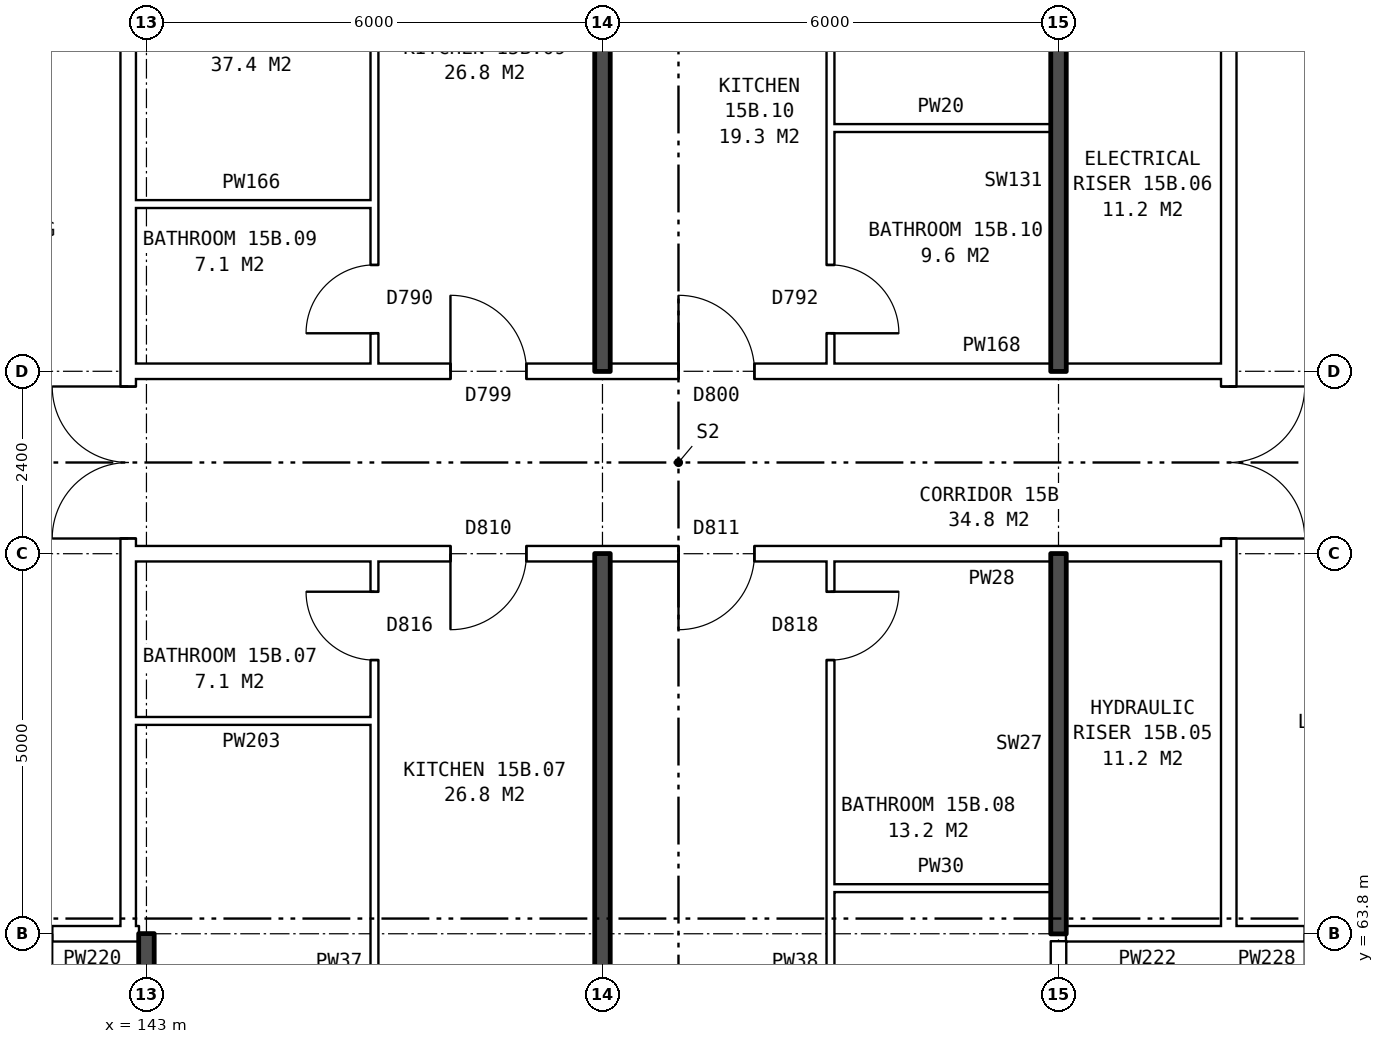
"""IFC4 building model, lengths in metres.
Left out: names, types, materials, properties, quantities, classifications, styles, units other than length and angle.
Written with IfcOpenShell. Run it as: python <this file> out.ifc"""

import sys

from ifc_helpers import new_model, si_unit, direction, frame, frame_2d, origin, place, context, subcontext, project, spatial, rectangle, extrude, element, fill, save


model = new_model("IFC4")
c1 = context("Model", 3, precision=1e-05, world=origin(), true_north=direction((0.0, 1.0)))
c2 = subcontext(c1, "Body", "Model", "MODEL_VIEW")
j1 = project(units=[si_unit("LENGTHUNIT", "METRE"), si_unit("PLANEANGLEUNIT", "RADIAN")], contexts=[c1])
p1 = place(None, origin())
s1 = spatial("IfcSite", under=j1, at=p1, CompositionType="ELEMENT")
p2 = place(p1, origin())
s2 = spatial("IfcBuilding", under=s1, at=p2, CompositionType="ELEMENT")
p3 = place(p2, frame((0.0, 0.0, 56.7)))
s3 = spatial("IfcBuildingStorey", under=s2, at=p3, CompositionType="ELEMENT", Elevation=56.7)
p4 = place(p3, frame((142.76, 63.9, 0.0), z_axis=(0.0, 0.0, 1.0), x_axis=(0.0, 1.0, 0.0)))
e1 = element("IfcWall", 1, at=p4, inside=s3, PredefinedType="PARTITIONING", context=c2, shape_type="SweptSolid", body=[
    extrude(rectangle(XDim=12.2, YDim=0.2, at=frame_2d((6.1, 0.0))), origin(), (0.0, 0.0, 1.0), 2.85),
])
p5 = place(p4, frame((5.1, 0.0, 0.0)))
e2 = element("IfcOpeningElement", 2, at=p5, cuts=e1, PredefinedType="OPENING", context=c2, shape_type="SweptSolid", body=[
    extrude(rectangle(XDim=2.0, YDim=2.1, at=frame_2d((1.0, 1.05))), frame((0.0, 0.11, 0.0), z_axis=(0.0, -1.0, 0.0), x_axis=(1.0, 0.0, 0.0)), (0.0, 0.0, 1.0), 0.22),
])
p6 = place(p3, frame((157.24, 63.9, 0.0), z_axis=(0.0, 0.0, 1.0), x_axis=(0.0, 1.0, 0.0)))
e3 = element("IfcWall", 3, at=p6, inside=s3, PredefinedType="PARTITIONING", context=c2, shape_type="SweptSolid", body=[
    extrude(rectangle(XDim=12.2, YDim=0.2, at=frame_2d((6.1, 0.0))), origin(), (0.0, 0.0, 1.0), 2.85),
])
p7 = place(p6, frame((5.1, 0.0, 0.0)))
e4 = element("IfcOpeningElement", 4, at=p7, cuts=e3, PredefinedType="OPENING", context=c2, shape_type="SweptSolid", body=[
    extrude(rectangle(XDim=2.0, YDim=2.1, at=frame_2d((1.0, 1.05))), frame((0.0, 0.11, 0.0), z_axis=(0.0, -1.0, 0.0), x_axis=(1.0, 0.0, 0.0)), (0.0, 0.0, 1.0), 0.22),
])
p8 = place(p3, frame((139.76, 63.8, 0.0), z_axis=(0.0, 0.0, 1.0), x_axis=(1.0, 0.0, 0.0)))
e5 = element("IfcWall", 5, at=p8, inside=s3, PredefinedType="PARTITIONING", context=c2, shape_type="SweptSolid", body=[
    extrude(rectangle(XDim=3.0, YDim=0.2, at=frame_2d((1.5, 0.0))), origin(), (0.0, 0.0, 1.0), 2.85),
])
p9 = place(p8, frame((1.0, 0.0, 0.0)))
e6 = element("IfcOpeningElement", 6, at=p9, cuts=e5, PredefinedType="OPENING", context=c2, shape_type="SweptSolid", body=[
    extrude(rectangle(XDim=1.0, YDim=2.1, at=frame_2d((0.5, 1.05))), frame((0.0, 0.11, 0.0), z_axis=(0.0, -1.0, 0.0), x_axis=(1.0, 0.0, 0.0)), (0.0, 0.0, 1.0), 0.22),
])
p10 = place(p3, frame((142.76, 63.8, 0.0), z_axis=(0.0, 0.0, 1.0), x_axis=(1.0, 0.0, 0.0)))
e7 = element("IfcWall", 7, at=p10, inside=s3, PredefinedType="PARTITIONING", context=c2, shape_type="SweptSolid", body=[
    extrude(rectangle(XDim=0.14, YDim=0.2, at=frame_2d((0.07, 0.0))), origin(), (0.0, 0.0, 1.0), 2.85),
])
p11 = place(p3, frame((155.1, 63.8, 0.0), z_axis=(0.0, 0.0, 1.0), x_axis=(1.0, 0.0, 0.0)))
e8 = element("IfcWall", 8, at=p11, inside=s3, PredefinedType="PARTITIONING", context=c2, shape_type="SweptSolid", body=[
    extrude(rectangle(XDim=2.14, YDim=0.2, at=frame_2d((1.07, 0.0))), origin(), (0.0, 0.0, 1.0), 2.85),
])
p12 = place(p3, frame((157.24, 63.8, 0.0), z_axis=(0.0, 0.0, 1.0), x_axis=(1.0, 0.0, 0.0)))
e9 = element("IfcWall", 9, at=p12, inside=s3, PredefinedType="PARTITIONING", context=c2, shape_type="SweptSolid", body=[
    extrude(rectangle(XDim=3.0, YDim=0.2, at=frame_2d((1.5, 0.0))), origin(), (0.0, 0.0, 1.0), 2.85),
])
p13 = place(p12, frame((1.0, 0.0, 0.0)))
e10 = element("IfcOpeningElement", 10, at=p13, cuts=e9, PredefinedType="OPENING", context=c2, shape_type="SweptSolid", body=[
    extrude(rectangle(XDim=1.0, YDim=2.1, at=frame_2d((0.5, 1.05))), frame((0.0, 0.11, 0.0), z_axis=(0.0, -1.0, 0.0), x_axis=(1.0, 0.0, 0.0)), (0.0, 0.0, 1.0), 0.22),
])
p14 = place(p3, frame((152.0, 64.4, 0.0), z_axis=(0.0, 0.0, 1.0), x_axis=(1.0, 0.0, 0.0)))
e11 = element("IfcWall", 11, at=p14, inside=s3, PredefinedType="PARTITIONING", context=c2, shape_type="SweptSolid", body=[
    extrude(rectangle(XDim=2.9, YDim=0.1, at=frame_2d((1.45, 0.0))), origin(), (0.0, 0.0, 1.0), 2.85),
])
p15 = place(p3, frame((142.76, 66.6, 0.0), z_axis=(0.0, 0.0, 1.0), x_axis=(1.0, 0.0, 0.0)))
e12 = element("IfcWall", 12, at=p15, inside=s3, PredefinedType="PARTITIONING", context=c2, shape_type="SweptSolid", body=[
    extrude(rectangle(XDim=3.24, YDim=0.1, at=frame_2d((1.62, 0.0))), origin(), (0.0, 0.0, 1.0), 2.85),
])
p16 = place(p3, frame((142.76, 68.8, 0.0), z_axis=(0.0, 0.0, 1.0), x_axis=(1.0, 0.0, 0.0)))
e13 = element("IfcWall", 13, at=p16, inside=s3, PredefinedType="PARTITIONING", context=c2, shape_type="SweptSolid", body=[
    extrude(rectangle(XDim=14.48, YDim=0.2, at=frame_2d((7.24, 0.0))), origin(), (0.0, 0.0, 1.0), 2.85),
])
p17 = place(p16, frame((4.24, 0.0, 0.0)))
e14 = element("IfcOpeningElement", 14, at=p17, cuts=e13, PredefinedType="OPENING", context=c2, shape_type="SweptSolid", body=[
    extrude(rectangle(XDim=1.0, YDim=2.1, at=frame_2d((0.5, 1.05))), frame((0.0, 0.11, 0.0), z_axis=(0.0, -1.0, 0.0), x_axis=(1.0, 0.0, 0.0)), (0.0, 0.0, 1.0), 0.22),
])
p18 = place(p16, frame((7.24, 0.0, 0.0)))
e15 = element("IfcOpeningElement", 15, at=p18, cuts=e13, PredefinedType="OPENING", context=c2, shape_type="SweptSolid", body=[
    extrude(rectangle(XDim=1.0, YDim=2.1, at=frame_2d((0.5, 1.05))), frame((0.0, 0.11, 0.0), z_axis=(0.0, -1.0, 0.0), x_axis=(1.0, 0.0, 0.0)), (0.0, 0.0, 1.0), 0.22),
])
p19 = place(p3, frame((142.76, 71.2, 0.0), z_axis=(0.0, 0.0, 1.0), x_axis=(1.0, 0.0, 0.0)))
e16 = element("IfcWall", 16, at=p19, inside=s3, PredefinedType="PARTITIONING", context=c2, shape_type="SweptSolid", body=[
    extrude(rectangle(XDim=14.48, YDim=0.2, at=frame_2d((7.24, 0.0))), origin(), (0.0, 0.0, 1.0), 2.85),
])
p20 = place(p19, frame((4.24, 0.0, 0.0)))
e17 = element("IfcOpeningElement", 17, at=p20, cuts=e16, PredefinedType="OPENING", context=c2, shape_type="SweptSolid", body=[
    extrude(rectangle(XDim=1.0, YDim=2.1, at=frame_2d((0.5, 1.05))), frame((0.0, 0.11, 0.0), z_axis=(0.0, -1.0, 0.0), x_axis=(1.0, 0.0, 0.0)), (0.0, 0.0, 1.0), 0.22),
])
p21 = place(p19, frame((7.24, 0.0, 0.0)))
e18 = element("IfcOpeningElement", 18, at=p21, cuts=e16, PredefinedType="OPENING", context=c2, shape_type="SweptSolid", body=[
    extrude(rectangle(XDim=1.0, YDim=2.1, at=frame_2d((0.5, 1.05))), frame((0.0, 0.11, 0.0), z_axis=(0.0, -1.0, 0.0), x_axis=(1.0, 0.0, 0.0)), (0.0, 0.0, 1.0), 0.22),
])
p22 = place(p3, frame((142.76, 73.4, 0.0), z_axis=(0.0, 0.0, 1.0), x_axis=(1.0, 0.0, 0.0)))
e19 = element("IfcWall", 19, at=p22, inside=s3, PredefinedType="PARTITIONING", context=c2, shape_type="SweptSolid", body=[
    extrude(rectangle(XDim=3.24, YDim=0.1, at=frame_2d((1.62, 0.0))), origin(), (0.0, 0.0, 1.0), 2.85),
])
p23 = place(p3, frame((152.0, 74.4, 0.0), z_axis=(0.0, 0.0, 1.0), x_axis=(1.0, 0.0, 0.0)))
e20 = element("IfcWall", 20, at=p23, inside=s3, PredefinedType="PARTITIONING", context=c2, shape_type="SweptSolid", body=[
    extrude(rectangle(XDim=2.9, YDim=0.1, at=frame_2d((1.45, 0.0))), origin(), (0.0, 0.0, 1.0), 2.85),
])
p24 = place(p3, frame((143.0, 54.36, 0.0), z_axis=(0.0, 0.0, 1.0), x_axis=(0.0, 1.0, 0.0)))
e21 = element("IfcWall", 21, at=p24, inside=s3, PredefinedType="SOLIDWALL", context=c2, shape_type="SweptSolid", body=[
    extrude(rectangle(XDim=9.44, YDim=0.2, at=frame_2d((4.72, 0.0))), origin(), (0.0, 0.0, 1.0), 2.85),
])
p25 = place(p3, frame((146.0, 54.36, 0.0), z_axis=(0.0, 0.0, 1.0), x_axis=(0.0, 1.0, 0.0)))
e22 = element("IfcWall", 22, at=p25, inside=s3, PredefinedType="PARTITIONING", context=c2, shape_type="SweptSolid", body=[
    extrude(rectangle(XDim=14.34, YDim=0.1, at=frame_2d((7.17, 0.0))), origin(), (0.0, 0.0, 1.0), 2.85),
])
p26 = place(p25, frame((4.2, 0.0, 0.0)))
e23 = element("IfcOpeningElement", 23, at=p26, cuts=e22, PredefinedType="OPENING", context=c2, shape_type="SweptSolid", body=[
    extrude(rectangle(XDim=0.9, YDim=2.1, at=frame_2d((0.45, 1.05))), frame((0.0, 0.06, 0.0), z_axis=(0.0, -1.0, 0.0), x_axis=(1.0, 0.0, 0.0)), (0.0, 0.0, 1.0), 0.12),
])
p27 = place(p25, frame((13.04, 0.0, 0.0)))
e24 = element("IfcOpeningElement", 24, at=p27, cuts=e22, PredefinedType="OPENING", context=c2, shape_type="SweptSolid", body=[
    extrude(rectangle(XDim=0.9, YDim=2.1, at=frame_2d((0.45, 1.05))), frame((0.0, 0.06, 0.0), z_axis=(0.0, -1.0, 0.0), x_axis=(1.0, 0.0, 0.0)), (0.0, 0.0, 1.0), 0.12),
])
p28 = place(p3, frame((146.0, 71.3, 0.0), z_axis=(0.0, 0.0, 1.0), x_axis=(0.0, 1.0, 0.0)))
e25 = element("IfcWall", 25, at=p28, inside=s3, PredefinedType="PARTITIONING", context=c2, shape_type="SweptSolid", body=[
    extrude(rectangle(XDim=14.34, YDim=0.1, at=frame_2d((7.17, 0.0))), origin(), (0.0, 0.0, 1.0), 2.85),
])
p29 = place(p28, frame((9.24, 0.0, 0.0)))
e26 = element("IfcOpeningElement", 26, at=p29, cuts=e25, PredefinedType="OPENING", context=c2, shape_type="SweptSolid", body=[
    extrude(rectangle(XDim=0.9, YDim=2.1, at=frame_2d((0.45, 1.05))), frame((0.0, 0.06, 0.0), z_axis=(0.0, -1.0, 0.0), x_axis=(1.0, 0.0, 0.0)), (0.0, 0.0, 1.0), 0.12),
])
p30 = place(p28, frame((0.4, 0.0, 0.0)))
e27 = element("IfcOpeningElement", 27, at=p30, cuts=e25, PredefinedType="OPENING", context=c2, shape_type="SweptSolid", body=[
    extrude(rectangle(XDim=0.9, YDim=2.1, at=frame_2d((0.45, 1.05))), frame((0.0, 0.06, 0.0), z_axis=(0.0, -1.0, 0.0), x_axis=(1.0, 0.0, 0.0)), (0.0, 0.0, 1.0), 0.12),
])
for number, where, z_axis, x_axis in (
    (28, (149.0, 54.36, 0.0), (0.0, 0.0, 1.0), (0.0, 1.0, 0.0)),
    (29, (149.0, 71.2, 0.0), (0.0, 0.0, 1.0), (0.0, 1.0, 0.0)),
):
    element("IfcWall", number, at=place(p3, frame(where, z_axis=z_axis, x_axis=x_axis)), inside=s3, PredefinedType="SOLIDWALL", context=c2, shape_type="SweptSolid", body=[
        extrude(rectangle(XDim=14.44, YDim=0.2, at=frame_2d((7.22, 0.0))), origin(), (0.0, 0.0, 1.0), 2.85),
    ])
p31 = place(p3, frame((152.0, 54.36, 0.0), z_axis=(0.0, 0.0, 1.0), x_axis=(0.0, 1.0, 0.0)))
e30 = element("IfcWall", 30, at=p31, inside=s3, PredefinedType="PARTITIONING", context=c2, shape_type="SweptSolid", body=[
    extrude(rectangle(XDim=14.34, YDim=0.1, at=frame_2d((7.17, 0.0))), origin(), (0.0, 0.0, 1.0), 2.85),
])
p32 = place(p31, frame((4.2, 0.0, 0.0)))
e31 = element("IfcOpeningElement", 31, at=p32, cuts=e30, PredefinedType="OPENING", context=c2, shape_type="SweptSolid", body=[
    extrude(rectangle(XDim=0.9, YDim=2.1, at=frame_2d((0.45, 1.05))), frame((0.0, 0.06, 0.0), z_axis=(0.0, -1.0, 0.0), x_axis=(1.0, 0.0, 0.0)), (0.0, 0.0, 1.0), 0.12),
])
p33 = place(p31, frame((13.04, 0.0, 0.0)))
e32 = element("IfcOpeningElement", 32, at=p33, cuts=e30, PredefinedType="OPENING", context=c2, shape_type="SweptSolid", body=[
    extrude(rectangle(XDim=0.9, YDim=2.1, at=frame_2d((0.45, 1.05))), frame((0.0, 0.06, 0.0), z_axis=(0.0, -1.0, 0.0), x_axis=(1.0, 0.0, 0.0)), (0.0, 0.0, 1.0), 0.12),
])
p34 = place(p3, frame((152.0, 71.3, 0.0), z_axis=(0.0, 0.0, 1.0), x_axis=(0.0, 1.0, 0.0)))
e33 = element("IfcWall", 33, at=p34, inside=s3, PredefinedType="PARTITIONING", context=c2, shape_type="SweptSolid", body=[
    extrude(rectangle(XDim=14.34, YDim=0.1, at=frame_2d((7.17, 0.0))), origin(), (0.0, 0.0, 1.0), 2.85),
])
p35 = place(p34, frame((6.74, 0.0, 0.0)))
e34 = element("IfcOpeningElement", 34, at=p35, cuts=e33, PredefinedType="OPENING", context=c2, shape_type="SweptSolid", body=[
    extrude(rectangle(XDim=0.9, YDim=2.1, at=frame_2d((0.45, 1.05))), frame((0.0, 0.06, 0.0), z_axis=(0.0, -1.0, 0.0), x_axis=(1.0, 0.0, 0.0)), (0.0, 0.0, 1.0), 0.12),
])
p36 = place(p34, frame((0.4, 0.0, 0.0)))
e35 = element("IfcOpeningElement", 35, at=p36, cuts=e33, PredefinedType="OPENING", context=c2, shape_type="SweptSolid", body=[
    extrude(rectangle(XDim=0.9, YDim=2.1, at=frame_2d((0.45, 1.05))), frame((0.0, 0.06, 0.0), z_axis=(0.0, -1.0, 0.0), x_axis=(1.0, 0.0, 0.0)), (0.0, 0.0, 1.0), 0.12),
])
p37 = place(p3, frame((155.0, 61.5, 0.0), z_axis=(0.0, 0.0, 1.0), x_axis=(0.0, 1.0, 0.0)))
e36 = element("IfcWall", 36, at=p37, inside=s3, PredefinedType="PARTITIONING", context=c2, shape_type="SweptSolid", body=[
    extrude(rectangle(XDim=2.2, YDim=0.2, at=frame_2d((1.1, 0.0))), origin(), (0.0, 0.0, 1.0), 2.85),
])
for number, where, z_axis, x_axis in (
    (37, (155.0, 63.8, 0.0), (0.0, 0.0, 1.0), (0.0, 1.0, 0.0)),
    (38, (155.0, 71.2, 0.0), (0.0, 0.0, 1.0), (0.0, 1.0, 0.0)),
):
    element("IfcWall", number, at=place(p3, frame(where, z_axis=z_axis, x_axis=x_axis)), inside=s3, PredefinedType="SOLIDWALL", context=c2, shape_type="SweptSolid", body=[
        extrude(rectangle(XDim=5.0, YDim=0.2, at=frame_2d((2.5, 0.0))), origin(), (0.0, 0.0, 1.0), 2.85),
    ])
p38 = place(p5, origin())
e39 = element("IfcDoor", 39, at=p38, inside=s3, OperationType="DOUBLE_DOOR_SINGLE_SWING", PredefinedType="DOOR", context=c2, shape_type="SweptSolid", body=[
    extrude(rectangle(XDim=2.0, YDim=2.1, at=frame_2d((1.0, 1.05))), frame((0.0, 0.025, 0.0), z_axis=(0.0, -1.0, 0.0), x_axis=(1.0, 0.0, 0.0)), (0.0, 0.0, 1.0), 0.05),
])
fill(e2, e39)
p39 = place(p7, frame((2.0, 0.0, 0.0), z_axis=(0.0, 0.0, 1.0), x_axis=(-1.0, 0.0, 0.0)))
e40 = element("IfcDoor", 40, at=p39, inside=s3, OperationType="DOUBLE_DOOR_SINGLE_SWING", PredefinedType="DOOR", context=c2, shape_type="SweptSolid", body=[
    extrude(rectangle(XDim=2.0, YDim=2.1, at=frame_2d((1.0, 1.05))), frame((0.0, 0.025, 0.0), z_axis=(0.0, -1.0, 0.0), x_axis=(1.0, 0.0, 0.0)), (0.0, 0.0, 1.0), 0.05),
])
fill(e4, e40)
p40 = place(p17, frame((1.0, 0.0, 0.0), z_axis=(0.0, 0.0, 1.0), x_axis=(-1.0, 0.0, 0.0)))
e41 = element("IfcDoor", 41, at=p40, inside=s3, OperationType="SINGLE_SWING_RIGHT", PredefinedType="DOOR", context=c2, shape_type="SweptSolid", body=[
    extrude(rectangle(XDim=1.0, YDim=2.1, at=frame_2d((0.5, 1.05))), frame((0.0, 0.025, 0.0), z_axis=(0.0, -1.0, 0.0), x_axis=(1.0, 0.0, 0.0)), (0.0, 0.0, 1.0), 0.05),
])
fill(e14, e41)
p41 = place(p27, origin())
e42 = element("IfcDoor", 42, at=p41, inside=s3, OperationType="SINGLE_SWING_RIGHT", PredefinedType="DOOR", context=c2, shape_type="SweptSolid", body=[
    extrude(rectangle(XDim=0.9, YDim=2.1, at=frame_2d((0.45, 1.05))), frame((0.0, 0.025, 0.0), z_axis=(0.0, -1.0, 0.0), x_axis=(1.0, 0.0, 0.0)), (0.0, 0.0, 1.0), 0.05),
])
fill(e24, e42)
p42 = place(p18, frame((1.0, 0.0, 0.0), z_axis=(0.0, 0.0, 1.0), x_axis=(-1.0, 0.0, 0.0)))
e43 = element("IfcDoor", 43, at=p42, inside=s3, OperationType="SINGLE_SWING_RIGHT", PredefinedType="DOOR", context=c2, shape_type="SweptSolid", body=[
    extrude(rectangle(XDim=1.0, YDim=2.1, at=frame_2d((0.5, 1.05))), frame((0.0, 0.025, 0.0), z_axis=(0.0, -1.0, 0.0), x_axis=(1.0, 0.0, 0.0)), (0.0, 0.0, 1.0), 0.05),
])
fill(e15, e43)
p43 = place(p33, frame((0.9, 0.0, 0.0), z_axis=(0.0, 0.0, 1.0), x_axis=(-1.0, 0.0, 0.0)))
e44 = element("IfcDoor", 44, at=p43, inside=s3, OperationType="SINGLE_SWING_LEFT", PredefinedType="DOOR", context=c2, shape_type="SweptSolid", body=[
    extrude(rectangle(XDim=0.9, YDim=2.1, at=frame_2d((0.45, 1.05))), frame((0.0, 0.025, 0.0), z_axis=(0.0, -1.0, 0.0), x_axis=(1.0, 0.0, 0.0)), (0.0, 0.0, 1.0), 0.05),
])
fill(e32, e44)
p44 = place(p20, origin())
e45 = element("IfcDoor", 45, at=p44, inside=s3, OperationType="SINGLE_SWING_LEFT", PredefinedType="DOOR", context=c2, shape_type="SweptSolid", body=[
    extrude(rectangle(XDim=1.0, YDim=2.1, at=frame_2d((0.5, 1.05))), frame((0.0, 0.025, 0.0), z_axis=(0.0, -1.0, 0.0), x_axis=(1.0, 0.0, 0.0)), (0.0, 0.0, 1.0), 0.05),
])
fill(e17, e45)
p45 = place(p30, origin())
e46 = element("IfcDoor", 46, at=p45, inside=s3, OperationType="SINGLE_SWING_LEFT", PredefinedType="DOOR", context=c2, shape_type="SweptSolid", body=[
    extrude(rectangle(XDim=0.9, YDim=2.1, at=frame_2d((0.45, 1.05))), frame((0.0, 0.025, 0.0), z_axis=(0.0, -1.0, 0.0), x_axis=(1.0, 0.0, 0.0)), (0.0, 0.0, 1.0), 0.05),
])
fill(e27, e46)
p46 = place(p21, origin())
e47 = element("IfcDoor", 47, at=p46, inside=s3, OperationType="SINGLE_SWING_LEFT", PredefinedType="DOOR", context=c2, shape_type="SweptSolid", body=[
    extrude(rectangle(XDim=1.0, YDim=2.1, at=frame_2d((0.5, 1.05))), frame((0.0, 0.025, 0.0), z_axis=(0.0, -1.0, 0.0), x_axis=(1.0, 0.0, 0.0)), (0.0, 0.0, 1.0), 0.05),
])
fill(e18, e47)
p47 = place(p36, frame((0.9, 0.0, 0.0), z_axis=(0.0, 0.0, 1.0), x_axis=(-1.0, 0.0, 0.0)))
e48 = element("IfcDoor", 48, at=p47, inside=s3, OperationType="SINGLE_SWING_RIGHT", PredefinedType="DOOR", context=c2, shape_type="SweptSolid", body=[
    extrude(rectangle(XDim=0.9, YDim=2.1, at=frame_2d((0.45, 1.05))), frame((0.0, 0.025, 0.0), z_axis=(0.0, -1.0, 0.0), x_axis=(1.0, 0.0, 0.0)), (0.0, 0.0, 1.0), 0.05),
])
fill(e35, e48)
save(model, sys.argv[1])
